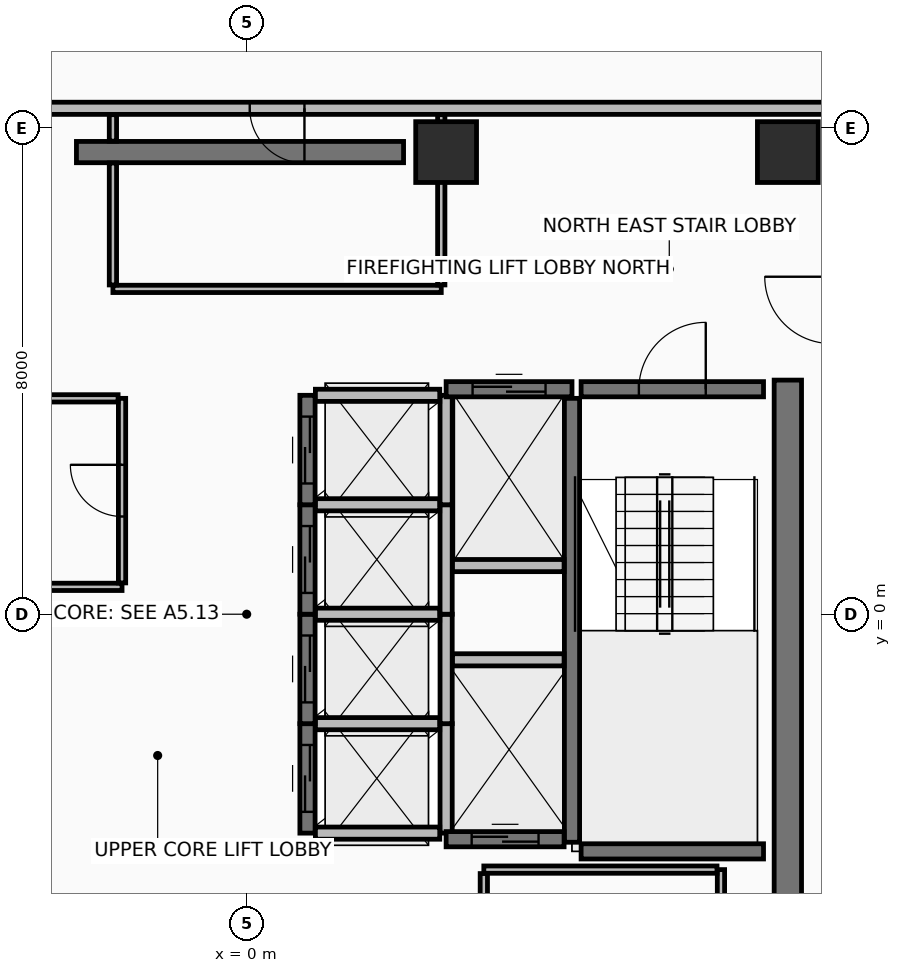
"""IFC4 building model, lengths in metres.
Left out: names, types, materials, properties, quantities, classifications, styles, units other than length and angle.
Written with IfcOpenShell. Run it as: python <this file> out.ifc"""

import sys

from ifc_helpers import new_model, si_unit, direction, frame, frame_2d, origin, origin_2d, place, context, subcontext, project, spatial, rectangle, extrude, element, fill, save


model = new_model("IFC4")
c1 = context("Model", 3, precision=1e-05, world=origin(), true_north=direction((0.0, 1.0)))
c2 = subcontext(c1, "Body", "Model", "MODEL_VIEW")
j1 = project(units=[si_unit("LENGTHUNIT", "METRE"), si_unit("PLANEANGLEUNIT", "RADIAN")], contexts=[c1])
p1 = place(None, origin())
s1 = spatial("IfcSite", under=j1, at=p1, CompositionType="ELEMENT")
p2 = place(p1, origin())
s2 = spatial("IfcBuilding", under=s1, at=p2, CompositionType="ELEMENT")
p3 = place(p2, frame((0.0, 0.0, 290.7)))
s3 = spatial("IfcBuildingStorey", under=s2, at=p3, CompositionType="ELEMENT", Elevation=290.7)
for number, where, z_axis, x_axis in (
    (1, (8.9, 7.6, 0.0), (0.0, 0.0, 1.0), (1.0, 0.0, 0.0)),
    (2, (3.28, 7.6, 0.0), (0.0, 0.0, 1.0), (1.0, 0.0, 0.0)),
):
    element("IfcColumn", number, at=place(p3, frame(where, z_axis=z_axis, x_axis=x_axis)), inside=s3, PredefinedType="COLUMN", context=c2, shape_type="SweptSolid", body=[
        extrude(rectangle(XDim=1.0, YDim=1.0, at=origin_2d()), origin(), (0.0, 0.0, 1.0), 3.65),
    ])
p4 = place(p3, frame((-2.8, 7.6, 0.0), z_axis=(0.0, 0.0, 1.0), x_axis=(1.0, 0.0, 0.0)))
e3 = element("IfcWall", 3, at=p4, inside=s3, PredefinedType="SHEAR", context=c2, shape_type="SweptSolid", body=[
    extrude(rectangle(XDim=5.38, YDim=0.35, at=frame_2d((2.69, 0.0))), origin(), (0.0, 0.0, 1.0), 3.465),
])
p5 = place(p3, frame((8.9, -6.85, 0.0), z_axis=(0.0, 0.0, 1.0), x_axis=(0.0, 1.0, 0.0)))
e4 = element("IfcWall", 4, at=p5, inside=s3, PredefinedType="SHEAR", context=c2, shape_type="SweptSolid", body=[
    extrude(rectangle(XDim=10.7, YDim=0.45, at=frame_2d((5.35, 0.0))), origin(), (0.0, 0.0, 1.0), 3.465),
])
p6 = place(p3, frame((9.62, 8.32, 0.0), z_axis=(0.0, 0.0, 1.0), x_axis=(-1.0, 0.0, 0.0)))
e5 = element("IfcWall", 5, at=p6, inside=s3, PredefinedType="PARTITIONING", context=c2, shape_type="SweptSolid", body=[
    extrude(rectangle(XDim=19.24, YDim=0.2, at=frame_2d((9.62, 0.0))), origin(), (0.0, 0.0, 1.0), 2.96),
])
p7 = place(p6, frame((8.67, 0.0, 0.0)))
e6 = element("IfcOpeningElement", 6, at=p7, cuts=e5, PredefinedType="OPENING", context=c2, shape_type="SweptSolid", body=[
    extrude(rectangle(XDim=0.9, YDim=2.1, at=frame_2d((0.45, 1.05))), frame((0.0, 0.11, 0.0), z_axis=(0.0, -1.0, 0.0), x_axis=(1.0, 0.0, 0.0)), (0.0, 0.0, 1.0), 0.22),
])
p8 = place(p6, frame((14.22, 0.0, 0.0)))
e7 = element("IfcOpeningElement", 7, at=p8, cuts=e5, PredefinedType="OPENING", context=c2, shape_type="SweptSolid", body=[
    extrude(rectangle(XDim=0.9, YDim=2.1, at=frame_2d((0.45, 1.05))), frame((0.0, 0.11, 0.0), z_axis=(0.0, -1.0, 0.0), x_axis=(1.0, 0.0, 0.0)), (0.0, 0.0, 1.0), 0.22),
])
p9 = place(p3, frame((5.35, -3.75, 0.0), z_axis=(0.0, 0.0, 1.0), x_axis=(0.0, 1.0, 0.0)))
e8 = element("IfcWall", 8, at=p9, inside=s3, PredefinedType="SHEAR", context=c2, shape_type="SweptSolid", body=[
    extrude(rectangle(XDim=7.3, YDim=0.25, at=frame_2d((3.65, 0.0))), origin(), (0.0, 0.0, 1.0), 3.465),
])
p10 = place(p3, frame((5.5, 3.7, 0.0), z_axis=(0.0, 0.0, 1.0), x_axis=(1.0, 0.0, 0.0)))
e9 = element("IfcWall", 9, at=p10, inside=s3, PredefinedType="SHEAR", context=c2, shape_type="SweptSolid", body=[
    extrude(rectangle(XDim=3.0, YDim=0.25, at=frame_2d((1.5, 0.0))), origin(), (0.0, 0.0, 1.0), 3.465),
])
p11 = place(p10, frame((0.95, 0.0, 0.0)))
e10 = element("IfcOpeningElement", 10, at=p11, cuts=e9, PredefinedType="OPENING", context=c2, shape_type="SweptSolid", body=[
    extrude(rectangle(XDim=1.1, YDim=2.15, at=frame_2d((0.55, 1.075))), frame((0.0, 0.135, 0.0), z_axis=(0.0, -1.0, 0.0), x_axis=(1.0, 0.0, 0.0)), (0.0, 0.0, 1.0), 0.27),
])
p12 = place(p3, frame((5.5, -3.9, 0.0), z_axis=(0.0, 0.0, 1.0), x_axis=(1.0, 0.0, 0.0)))
e11 = element("IfcWall", 11, at=p12, inside=s3, PredefinedType="SHEAR", context=c2, shape_type="SweptSolid", body=[
    extrude(rectangle(XDim=3.0, YDim=0.25, at=frame_2d((1.5, 0.0))), origin(), (0.0, 0.0, 1.0), 3.465),
])
p13 = place(p3, frame((1.0, -3.6, 0.0), z_axis=(0.0, 0.0, 1.0), x_axis=(0.0, 1.0, 0.0)))
e12 = element("IfcWall", 12, at=p13, inside=s3, PredefinedType="SHEAR", context=c2, shape_type="SweptSolid", body=[
    extrude(rectangle(XDim=1.8, YDim=0.25, at=frame_2d((0.9, 0.0))), origin(), (0.0, 0.0, 1.0), 3.465),
])
p14 = place(p13, frame((0.35, 0.0, 0.0)))
e13 = element("IfcOpeningElement", 13, at=p14, cuts=e12, PredefinedType="OPENING", context=c2, shape_type="SweptSolid", body=[
    extrude(rectangle(XDim=1.1, YDim=2.2, at=frame_2d((0.55, 1.1))), frame((0.0, 0.135, 0.0), z_axis=(0.0, -1.0, 0.0), x_axis=(1.0, 0.0, 0.0)), (0.0, 0.0, 1.0), 0.27),
])
p15 = place(p3, frame((3.28, -3.6, 0.0), z_axis=(0.0, 0.0, 1.0), x_axis=(0.0, 1.0, 0.0)))
e14 = element("IfcWall", 14, at=p15, inside=s3, PredefinedType="PARTITIONING", context=c2, shape_type="SweptSolid", body=[
    extrude(rectangle(XDim=1.8, YDim=0.2, at=frame_2d((0.9, 0.0))), origin(), (0.0, 0.0, 1.0), 3.465),
])
for number, where, z_axis, x_axis in (
    (15, (1.13, -3.6, 0.0), (0.0, 0.0, 1.0), (1.0, 0.0, 0.0)),
    (16, (1.13, -1.8, 0.0), (0.0, 0.0, 1.0), (1.0, 0.0, 0.0)),
):
    element("IfcWall", number, at=place(p3, frame(where, z_axis=z_axis, x_axis=x_axis)), inside=s3, PredefinedType="PARTITIONING", context=c2, shape_type="SweptSolid", body=[
        extrude(rectangle(XDim=2.045, YDim=0.2, at=frame_2d((1.022, 0.0))), origin(), (0.0, 0.0, 1.0), 3.465),
    ])
p16 = place(p3, frame((1.0, -1.8, 0.0), z_axis=(0.0, 0.0, 1.0), x_axis=(0.0, 1.0, 0.0)))
e17 = element("IfcWall", 17, at=p16, inside=s3, PredefinedType="SHEAR", context=c2, shape_type="SweptSolid", body=[
    extrude(rectangle(XDim=1.8, YDim=0.25, at=frame_2d((0.9, 0.0))), origin(), (0.0, 0.0, 1.0), 3.465),
])
p17 = place(p16, frame((0.35, 0.0, 0.0)))
e18 = element("IfcOpeningElement", 18, at=p17, cuts=e17, PredefinedType="OPENING", context=c2, shape_type="SweptSolid", body=[
    extrude(rectangle(XDim=1.1, YDim=2.2, at=frame_2d((0.55, 1.1))), frame((0.0, 0.135, 0.0), z_axis=(0.0, -1.0, 0.0), x_axis=(1.0, 0.0, 0.0)), (0.0, 0.0, 1.0), 0.27),
])
p18 = place(p3, frame((3.28, -1.8, 0.0), z_axis=(0.0, 0.0, 1.0), x_axis=(0.0, 1.0, 0.0)))
e19 = element("IfcWall", 19, at=p18, inside=s3, PredefinedType="PARTITIONING", context=c2, shape_type="SweptSolid", body=[
    extrude(rectangle(XDim=1.8, YDim=0.2, at=frame_2d((0.9, 0.0))), origin(), (0.0, 0.0, 1.0), 3.465),
])
p19 = place(p3, frame((1.13, 0.0, 0.0), z_axis=(0.0, 0.0, 1.0), x_axis=(1.0, 0.0, 0.0)))
e20 = element("IfcWall", 20, at=p19, inside=s3, PredefinedType="PARTITIONING", context=c2, shape_type="SweptSolid", body=[
    extrude(rectangle(XDim=2.045, YDim=0.2, at=frame_2d((1.022, 0.0))), origin(), (0.0, 0.0, 1.0), 3.465),
])
p20 = place(p3, frame((1.0, 0.0, 0.0), z_axis=(0.0, 0.0, 1.0), x_axis=(0.0, 1.0, 0.0)))
e21 = element("IfcWall", 21, at=p20, inside=s3, PredefinedType="SHEAR", context=c2, shape_type="SweptSolid", body=[
    extrude(rectangle(XDim=1.8, YDim=0.25, at=frame_2d((0.9, 0.0))), origin(), (0.0, 0.0, 1.0), 3.465),
])
p21 = place(p20, frame((0.35, 0.0, 0.0)))
e22 = element("IfcOpeningElement", 22, at=p21, cuts=e21, PredefinedType="OPENING", context=c2, shape_type="SweptSolid", body=[
    extrude(rectangle(XDim=1.1, YDim=2.2, at=frame_2d((0.55, 1.1))), frame((0.0, 0.135, 0.0), z_axis=(0.0, -1.0, 0.0), x_axis=(1.0, 0.0, 0.0)), (0.0, 0.0, 1.0), 0.27),
])
p22 = place(p3, frame((3.28, 0.0, 0.0), z_axis=(0.0, 0.0, 1.0), x_axis=(0.0, 1.0, 0.0)))
e23 = element("IfcWall", 23, at=p22, inside=s3, PredefinedType="PARTITIONING", context=c2, shape_type="SweptSolid", body=[
    extrude(rectangle(XDim=1.8, YDim=0.2, at=frame_2d((0.9, 0.0))), origin(), (0.0, 0.0, 1.0), 3.465),
])
p23 = place(p3, frame((1.13, 1.8, 0.0), z_axis=(0.0, 0.0, 1.0), x_axis=(1.0, 0.0, 0.0)))
e24 = element("IfcWall", 24, at=p23, inside=s3, PredefinedType="PARTITIONING", context=c2, shape_type="SweptSolid", body=[
    extrude(rectangle(XDim=2.045, YDim=0.2, at=frame_2d((1.022, 0.0))), origin(), (0.0, 0.0, 1.0), 3.465),
])
p24 = place(p3, frame((1.0, 1.8, 0.0), z_axis=(0.0, 0.0, 1.0), x_axis=(0.0, 1.0, 0.0)))
e25 = element("IfcWall", 25, at=p24, inside=s3, PredefinedType="SHEAR", context=c2, shape_type="SweptSolid", body=[
    extrude(rectangle(XDim=1.8, YDim=0.25, at=frame_2d((0.9, 0.0))), origin(), (0.0, 0.0, 1.0), 3.465),
])
p25 = place(p24, frame((0.35, 0.0, 0.0)))
e26 = element("IfcOpeningElement", 26, at=p25, cuts=e25, PredefinedType="OPENING", context=c2, shape_type="SweptSolid", body=[
    extrude(rectangle(XDim=1.1, YDim=2.2, at=frame_2d((0.55, 1.1))), frame((0.0, 0.135, 0.0), z_axis=(0.0, -1.0, 0.0), x_axis=(1.0, 0.0, 0.0)), (0.0, 0.0, 1.0), 0.27),
])
p26 = place(p3, frame((3.28, 1.8, 0.0), z_axis=(0.0, 0.0, 1.0), x_axis=(0.0, 1.0, 0.0)))
e27 = element("IfcWall", 27, at=p26, inside=s3, PredefinedType="PARTITIONING", context=c2, shape_type="SweptSolid", body=[
    extrude(rectangle(XDim=1.8, YDim=0.2, at=frame_2d((0.9, 0.0))), origin(), (0.0, 0.0, 1.0), 3.465),
])
p27 = place(p3, frame((1.13, 3.6, 0.0), z_axis=(0.0, 0.0, 1.0), x_axis=(1.0, 0.0, 0.0)))
e28 = element("IfcWall", 28, at=p27, inside=s3, PredefinedType="PARTITIONING", context=c2, shape_type="SweptSolid", body=[
    extrude(rectangle(XDim=2.045, YDim=0.2, at=frame_2d((1.022, 0.0))), origin(), (0.0, 0.0, 1.0), 2.76),
])
p28 = place(p3, frame((3.28, 3.7, 0.0), z_axis=(0.0, 0.0, 1.0), x_axis=(1.0, 0.0, 0.0)))
e29 = element("IfcWall", 29, at=p28, inside=s3, PredefinedType="SHEAR", context=c2, shape_type="SweptSolid", body=[
    extrude(rectangle(XDim=2.07, YDim=0.25, at=frame_2d((1.035, 0.0))), origin(), (0.0, 0.0, 1.0), 3.465),
])
p29 = place(p28, frame((0.435, 0.0, 0.0)))
e30 = element("IfcOpeningElement", 30, at=p29, cuts=e29, PredefinedType="OPENING", context=c2, shape_type="SweptSolid", body=[
    extrude(rectangle(XDim=1.2, YDim=2.2, at=frame_2d((0.6, 1.1))), frame((0.0, 0.135, 0.0), z_axis=(0.0, -1.0, 0.0), x_axis=(1.0, 0.0, 0.0)), (0.0, 0.0, 1.0), 0.27),
])
p30 = place(p3, frame((3.385, 0.8, 0.0), z_axis=(0.0, 0.0, 1.0), x_axis=(1.0, 0.0, 0.0)))
e31 = element("IfcWall", 31, at=p30, inside=s3, PredefinedType="PARTITIONING", context=c2, shape_type="SweptSolid", body=[
    extrude(rectangle(XDim=1.835, YDim=0.2, at=frame_2d((0.917, 0.0))), origin(), (0.0, 0.0, 1.0), 3.465),
])
p31 = place(p3, frame((3.28, -3.7, 0.0), z_axis=(0.0, 0.0, 1.0), x_axis=(1.0, 0.0, 0.0)))
e32 = element("IfcWall", 32, at=p31, inside=s3, PredefinedType="SHEAR", context=c2, shape_type="SweptSolid", body=[
    extrude(rectangle(XDim=1.94, YDim=0.25, at=frame_2d((0.97, 0.0))), origin(), (0.0, 0.0, 1.0), 3.465),
])
p32 = place(p31, frame((0.42, 0.0, 0.0)))
e33 = element("IfcOpeningElement", 33, at=p32, cuts=e32, PredefinedType="OPENING", context=c2, shape_type="SweptSolid", body=[
    extrude(rectangle(XDim=1.1, YDim=2.2, at=frame_2d((0.55, 1.1))), frame((0.0, 0.135, 0.0), z_axis=(0.0, -1.0, 0.0), x_axis=(1.0, 0.0, 0.0)), (0.0, 0.0, 1.0), 0.27),
])
p33 = place(p3, frame((3.385, -0.75, 0.0), z_axis=(0.0, 0.0, 1.0), x_axis=(1.0, 0.0, 0.0)))
e34 = element("IfcWall", 34, at=p33, inside=s3, PredefinedType="PARTITIONING", context=c2, shape_type="SweptSolid", body=[
    extrude(rectangle(XDim=1.835, YDim=0.2, at=frame_2d((0.917, 0.0))), origin(), (0.0, 0.0, 1.0), 3.465),
])
p34 = place(p3, frame((-5.22, 0.45, 0.0), z_axis=(0.0, 0.0, 1.0), x_axis=(1.0, 0.0, 0.0)))
e35 = element("IfcWall", 35, at=p34, inside=s3, PredefinedType="PARTITIONING", context=c2, shape_type="SweptSolid", body=[
    extrude(rectangle(XDim=3.17, YDim=0.12, at=frame_2d((1.585, 0.0))), origin(), (0.0, 0.0, 1.0), 3.465),
])
p35 = place(p3, frame((-2.05, 0.515, 0.0), z_axis=(0.0, 0.0, 1.0), x_axis=(0.0, 1.0, 0.0)))
e36 = element("IfcWall", 36, at=p35, inside=s3, PredefinedType="PARTITIONING", context=c2, shape_type="SweptSolid", body=[
    extrude(rectangle(XDim=3.035, YDim=0.12, at=frame_2d((1.518, 0.0))), origin(), (0.0, 0.0, 1.0), 3.465),
])
p36 = place(p35, frame((1.092, 0.0, 0.0)))
e37 = element("IfcOpeningElement", 37, at=p36, cuts=e36, PredefinedType="OPENING", context=c2, shape_type="SweptSolid", body=[
    extrude(rectangle(XDim=0.85, YDim=2.1, at=frame_2d((0.425, 1.05))), frame((0.0, 0.07, 0.0), z_axis=(0.0, -1.0, 0.0), x_axis=(1.0, 0.0, 0.0)), (0.0, 0.0, 1.0), 0.14),
])
p37 = place(p3, frame((-2.115, 3.55, 0.0), z_axis=(0.0, 0.0, 1.0), x_axis=(-1.0, 0.0, 0.0)))
e38 = element("IfcWall", 38, at=p37, inside=s3, PredefinedType="PARTITIONING", context=c2, shape_type="SweptSolid", body=[
    extrude(rectangle(XDim=3.105, YDim=0.12, at=frame_2d((1.552, 0.0))), origin(), (0.0, 0.0, 1.0), 3.465),
])
p38 = place(p3, frame((-2.2, 5.35, 0.0), z_axis=(0.0, 0.0, 1.0), x_axis=(1.0, 0.0, 0.0)))
e39 = element("IfcWall", 39, at=p38, inside=s3, PredefinedType="PARTITIONING", context=c2, shape_type="SweptSolid", body=[
    extrude(rectangle(XDim=5.4, YDim=0.12, at=frame_2d((2.7, 0.0))), origin(), (0.0, 0.0, 1.0), 2.76),
])
p39 = place(p3, frame((3.2, 5.415, 0.0), z_axis=(0.0, 0.0, 1.0), x_axis=(0.0, 1.0, 0.0)))
e40 = element("IfcWall", 40, at=p39, inside=s3, PredefinedType="PARTITIONING", context=c2, shape_type="SweptSolid", body=[
    extrude(rectangle(XDim=2.8, YDim=0.12, at=frame_2d((1.4, 0.0))), origin(), (0.0, 0.0, 1.0), 2.76),
])
p40 = place(p3, frame((-2.2, 8.215, 0.0), z_axis=(0.0, 0.0, 1.0), x_axis=(0.0, -1.0, 0.0)))
e41 = element("IfcWall", 41, at=p40, inside=s3, PredefinedType="PARTITIONING", context=c2, shape_type="SweptSolid", body=[
    extrude(rectangle(XDim=0.435, YDim=0.12, at=frame_2d((0.218, 0.0))), origin(), (0.0, 0.0, 1.0), 2.76),
])
p41 = place(p3, frame((-2.2, 7.42, 0.0), z_axis=(0.0, 0.0, 1.0), x_axis=(0.0, -1.0, 0.0)))
e42 = element("IfcWall", 42, at=p41, inside=s3, PredefinedType="PARTITIONING", context=c2, shape_type="SweptSolid", body=[
    extrude(rectangle(XDim=2.005, YDim=0.12, at=frame_2d((1.002, 0.0))), origin(), (0.0, 0.0, 1.0), 2.76),
])
p42 = place(p3, frame((7.8, -8.215, 0.0), z_axis=(0.0, 0.0, 1.0), x_axis=(0.0, 1.0, 0.0)))
e43 = element("IfcWall", 43, at=p42, inside=s3, PredefinedType="PARTITIONING", context=c2, shape_type="SweptSolid", body=[
    extrude(rectangle(XDim=4.015, YDim=0.12, at=frame_2d((2.008, 0.0))), origin(), (0.0, 0.0, 1.0), 2.76),
])
p43 = place(p3, frame((7.735, -4.2, 0.0), z_axis=(0.0, 0.0, 1.0), x_axis=(-1.0, 0.0, 0.0)))
e44 = element("IfcWall", 44, at=p43, inside=s3, PredefinedType="PARTITIONING", context=c2, shape_type="SweptSolid", body=[
    extrude(rectangle(XDim=3.835, YDim=0.12, at=frame_2d((1.917, 0.0))), origin(), (0.0, 0.0, 1.0), 3.465),
])
p44 = place(p3, frame((3.9, -4.265, 0.0), z_axis=(0.0, 0.0, 1.0), x_axis=(0.0, -1.0, 0.0)))
e45 = element("IfcWall", 45, at=p44, inside=s3, PredefinedType="PARTITIONING", context=c2, shape_type="SweptSolid", body=[
    extrude(rectangle(XDim=3.95, YDim=0.12, at=frame_2d((1.975, 0.0))), origin(), (0.0, 0.0, 1.0), 2.76),
])
p45 = place(p3, frame((17.777, -3.807, 0.0), z_axis=(0.0, 0.0, 1.0), x_axis=(-0.309024581215, -0.951054051148, 0.0)))
e46 = element("IfcWall", 46, at=p45, inside=s3, PredefinedType="PARTITIONING", context=c2, shape_type="SweptSolid", body=[
    extrude(rectangle(XDim=30.614, YDim=0.15, at=frame_2d((15.307, 0.0))), origin(), (0.0, 0.0, 1.0), 3.465),
])
p46 = place(p11, frame((1.1, 0.0, 0.0), z_axis=(0.0, 0.0, 1.0), x_axis=(-1.0, 0.0, 0.0)))
e47 = element("IfcDoor", 47, at=p46, inside=s3, OperationType="SINGLE_SWING_LEFT", PredefinedType="DOOR", context=c2, shape_type="SweptSolid", body=[
    extrude(rectangle(XDim=1.1, YDim=2.15, at=frame_2d((0.55, 1.075))), frame((0.0, 0.025, 0.0), z_axis=(0.0, -1.0, 0.0), x_axis=(1.0, 0.0, 0.0)), (0.0, 0.0, 1.0), 0.05),
])
fill(e10, e47)
p47 = place(p14, origin())
e48 = element("IfcDoor", 48, at=p47, inside=s3, OperationType="SLIDING_TO_LEFT", PredefinedType="DOOR", context=c2, shape_type="SweptSolid", body=[
    extrude(rectangle(XDim=1.1, YDim=2.2, at=frame_2d((0.55, 1.1))), frame((0.0, 0.025, 0.0), z_axis=(0.0, -1.0, 0.0), x_axis=(1.0, 0.0, 0.0)), (0.0, 0.0, 1.0), 0.05),
])
fill(e13, e48)
p48 = place(p17, origin())
e49 = element("IfcDoor", 49, at=p48, inside=s3, OperationType="SLIDING_TO_LEFT", PredefinedType="DOOR", context=c2, shape_type="SweptSolid", body=[
    extrude(rectangle(XDim=1.1, YDim=2.2, at=frame_2d((0.55, 1.1))), frame((0.0, 0.025, 0.0), z_axis=(0.0, -1.0, 0.0), x_axis=(1.0, 0.0, 0.0)), (0.0, 0.0, 1.0), 0.05),
])
fill(e18, e49)
p49 = place(p21, origin())
e50 = element("IfcDoor", 50, at=p49, inside=s3, OperationType="SLIDING_TO_LEFT", PredefinedType="DOOR", context=c2, shape_type="SweptSolid", body=[
    extrude(rectangle(XDim=1.1, YDim=2.2, at=frame_2d((0.55, 1.1))), frame((0.0, 0.025, 0.0), z_axis=(0.0, -1.0, 0.0), x_axis=(1.0, 0.0, 0.0)), (0.0, 0.0, 1.0), 0.05),
])
fill(e22, e50)
p50 = place(p25, origin())
e51 = element("IfcDoor", 51, at=p50, inside=s3, OperationType="SLIDING_TO_LEFT", PredefinedType="DOOR", context=c2, shape_type="SweptSolid", body=[
    extrude(rectangle(XDim=1.1, YDim=2.2, at=frame_2d((0.55, 1.1))), frame((0.0, 0.025, 0.0), z_axis=(0.0, -1.0, 0.0), x_axis=(1.0, 0.0, 0.0)), (0.0, 0.0, 1.0), 0.05),
])
fill(e26, e51)
p51 = place(p29, origin())
e52 = element("IfcDoor", 52, at=p51, inside=s3, OperationType="SLIDING_TO_RIGHT", PredefinedType="DOOR", context=c2, shape_type="SweptSolid", body=[
    extrude(rectangle(XDim=1.2, YDim=2.2, at=frame_2d((0.6, 1.1))), frame((0.0, 0.025, 0.0), z_axis=(0.0, -1.0, 0.0), x_axis=(1.0, 0.0, 0.0)), (0.0, 0.0, 1.0), 0.05),
])
fill(e30, e52)
p52 = place(p32, origin())
e53 = element("IfcDoor", 53, at=p52, inside=s3, OperationType="SLIDING_TO_LEFT", PredefinedType="DOOR", context=c2, shape_type="SweptSolid", body=[
    extrude(rectangle(XDim=1.1, YDim=2.2, at=frame_2d((0.55, 1.1))), frame((0.0, 0.025, 0.0), z_axis=(0.0, -1.0, 0.0), x_axis=(1.0, 0.0, 0.0)), (0.0, 0.0, 1.0), 0.05),
])
fill(e33, e53)
p53 = place(p36, frame((0.85, 0.0, 0.0), z_axis=(0.0, 0.0, 1.0), x_axis=(-1.0, 0.0, 0.0)))
e54 = element("IfcDoor", 54, at=p53, inside=s3, OperationType="SINGLE_SWING_RIGHT", PredefinedType="DOOR", context=c2, shape_type="SweptSolid", body=[
    extrude(rectangle(XDim=0.85, YDim=2.1, at=frame_2d((0.425, 1.05))), frame((0.0, 0.025, 0.0), z_axis=(0.0, -1.0, 0.0), x_axis=(1.0, 0.0, 0.0)), (0.0, 0.0, 1.0), 0.05),
])
fill(e37, e54)
p54 = place(p7, origin())
e55 = element("IfcDoor", 55, at=p54, inside=s3, OperationType="SINGLE_SWING_LEFT", PredefinedType="DOOR", context=c2, shape_type="SweptSolid", body=[
    extrude(rectangle(XDim=0.9, YDim=2.1, at=frame_2d((0.45, 1.05))), frame((0.0, 0.025, 0.0), z_axis=(0.0, -1.0, 0.0), x_axis=(1.0, 0.0, 0.0)), (0.0, 0.0, 1.0), 0.05),
])
fill(e6, e55)
save(model, sys.argv[1])
